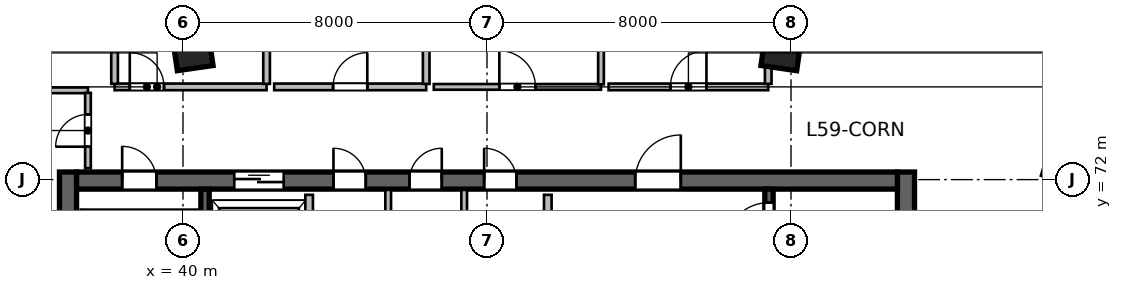
"""IFC4 building model, lengths in metres.
Left out: names, types, materials, properties, quantities, classifications, styles, units other than length and angle.
Written with IfcOpenShell. Run it as: python <this file> out.ifc"""

import sys

from ifc_helpers import new_model, si_unit, direction, frame, frame_2d, origin, origin_2d, place, context, subcontext, project, spatial, rectangle, extrude, source, transform, mapped, element, fill, save


model = new_model("IFC4")
c1 = context("Model", 3, precision=1e-05, world=origin(), true_north=direction((0.0, 1.0)))
c2 = subcontext(c1, "Body", "Model", "MODEL_VIEW")
j1 = project(units=[si_unit("LENGTHUNIT", "METRE"), si_unit("PLANEANGLEUNIT", "RADIAN")], contexts=[c1])
p1 = place(None, origin())
s1 = spatial("IfcSite", under=j1, at=p1, CompositionType="ELEMENT")
p2 = place(p1, origin())
s2 = spatial("IfcBuilding", under=s1, at=p2, CompositionType="ELEMENT")
p3 = place(p2, frame((0.0, 0.0, 243.0)))
s3 = spatial("IfcBuildingStorey", under=s2, at=p3, CompositionType="ELEMENT", Elevation=243.0)
m1 = source(origin(), c2, "Body", "SweptSolid", [
    extrude(rectangle(XDim=12.0, YDim=0.45, at=frame_2d((6.0, 0.0))), origin(), (0.0, 0.0, 1.0), 3.9),
])
for number, where, z_axis, x_axis in (
    (1, (36.975, 60.2, 0.0), (0.0, 0.0, 1.0), (0.0, 1.0, 0.0)),
    (2, (59.025, 60.2, 0.0), (0.0, 0.0, 1.0), (0.0, 1.0, 0.0)),
):
    element("IfcWall", number, at=place(p3, frame(where, z_axis=z_axis, x_axis=x_axis)), inside=s3, PredefinedType="SHEAR", context=c2, shape_type="MappedRepresentation", body=[
        mapped(m1, transform((0.0, 0.0, 0.0), scale=1.0)),
    ])
m2 = source(origin(), c2, "Body", "SweptSolid", [
    extrude(rectangle(XDim=21.6, YDim=0.45, at=frame_2d((10.8, 0.0))), origin(), (0.0, 0.0, 1.0), 3.9),
])
p4 = place(p3, frame((37.2, 71.975, 0.0), z_axis=(0.0, 0.0, 1.0), x_axis=(1.0, 0.0, 0.0)))
e3 = element("IfcWall", 3, at=p4, inside=s3, PredefinedType="SHEAR", context=c2, shape_type="MappedRepresentation", body=[
    mapped(m2, transform((0.0, 0.0, 0.0), scale=1.0)),
])
p5 = place(p4, frame((1.2, 0.0, 0.0)))
e4 = element("IfcOpeningElement", 4, at=p5, cuts=e3, PredefinedType="OPENING", context=c2, shape_type="SweptSolid", body=[
    extrude(rectangle(XDim=0.9, YDim=2.1, at=frame_2d((0.45, 1.05))), frame((0.0, 0.235, 0.0), z_axis=(0.0, -1.0, 0.0), x_axis=(1.0, 0.0, 0.0)), (0.0, 0.0, 1.0), 0.47),
])
p6 = place(p4, frame((14.7, 0.0, 0.0)))
e5 = element("IfcOpeningElement", 5, at=p6, cuts=e3, PredefinedType="OPENING", context=c2, shape_type="SweptSolid", body=[
    extrude(rectangle(XDim=1.2, YDim=2.15, at=frame_2d((0.6, 1.075))), frame((0.0, 0.235, 0.0), z_axis=(0.0, -1.0, 0.0), x_axis=(1.0, 0.0, 0.0)), (0.0, 0.0, 1.0), 0.47),
])
p7 = place(p4, frame((4.15, 0.0, 0.0)))
e6 = element("IfcOpeningElement", 6, at=p7, cuts=e3, PredefinedType="OPENING", context=c2, shape_type="SweptSolid", body=[
    extrude(rectangle(XDim=1.3, YDim=2.15, at=frame_2d((0.65, 1.075))), frame((0.0, 0.235, 0.0), z_axis=(0.0, -1.0, 0.0), x_axis=(1.0, 0.0, 0.0)), (0.0, 0.0, 1.0), 0.47),
])
p8 = place(p4, frame((6.76, 0.0, 0.0)))
e7 = element("IfcOpeningElement", 7, at=p8, cuts=e3, PredefinedType="OPENING", context=c2, shape_type="SweptSolid", body=[
    extrude(rectangle(XDim=0.85, YDim=2.1, at=frame_2d((0.425, 1.05))), frame((0.0, 0.235, 0.0), z_axis=(0.0, -1.0, 0.0), x_axis=(1.0, 0.0, 0.0)), (0.0, 0.0, 1.0), 0.47),
])
p9 = place(p4, frame((8.76, 0.0, 0.0)))
e8 = element("IfcOpeningElement", 8, at=p9, cuts=e3, PredefinedType="OPENING", context=c2, shape_type="SweptSolid", body=[
    extrude(rectangle(XDim=0.85, YDim=2.1, at=frame_2d((0.425, 1.05))), frame((0.0, 0.235, 0.0), z_axis=(0.0, -1.0, 0.0), x_axis=(1.0, 0.0, 0.0)), (0.0, 0.0, 1.0), 0.47),
])
p10 = place(p4, frame((10.725, 0.0, 0.0)))
e9 = element("IfcOpeningElement", 9, at=p10, cuts=e3, PredefinedType="OPENING", context=c2, shape_type="SweptSolid", body=[
    extrude(rectangle(XDim=0.85, YDim=2.1, at=frame_2d((0.425, 1.05))), frame((0.0, 0.235, 0.0), z_axis=(0.0, -1.0, 0.0), x_axis=(1.0, 0.0, 0.0)), (0.0, 0.0, 1.0), 0.47),
])
m3 = source(origin(), c2, "Body", "SweptSolid", [
    extrude(rectangle(XDim=11.1, YDim=0.22, at=frame_2d((5.55, 0.0))), origin(), (0.0, 0.0, 1.0), 3.9),
])
p11 = place(p3, frame((40.58, 60.65, 0.0), z_axis=(0.0, 0.0, 1.0), x_axis=(0.0, 1.0, 0.0)))
e10 = element("IfcWall", 10, at=p11, inside=s3, PredefinedType="SHEAR", context=c2, shape_type="MappedRepresentation", body=[
    mapped(m3, transform((0.0, 0.0, 0.0), scale=1.0)),
])
p12 = place(p3, frame((55.42, 60.65, 0.0), z_axis=(0.0, 0.0, 1.0), x_axis=(0.0, 1.0, 0.0)))
e11 = element("IfcWall", 11, at=p12, inside=s3, PredefinedType="SHEAR", context=c2, shape_type="MappedRepresentation", body=[
    mapped(m3, transform((0.0, 0.0, 0.0), scale=1.0)),
])
p13 = place(p12, frame((9.595, 0.0, 0.0)))
e12 = element("IfcOpeningElement", 12, at=p13, cuts=e11, PredefinedType="OPENING", context=c2, shape_type="SweptSolid", body=[
    extrude(rectangle(XDim=1.15, YDim=2.15, at=frame_2d((0.575, 1.075))), frame((0.0, 0.12, 0.0), z_axis=(0.0, -1.0, 0.0), x_axis=(1.0, 0.0, 0.0)), (0.0, 0.0, 1.0), 0.24),
])
m4 = source(origin(), c2, "Body", "SweptSolid", [
    extrude(rectangle(XDim=0.95, YDim=0.95, at=origin_2d()), origin(), (0.0, 0.0, 1.0), 3.9),
])
for number, where, z_axis, x_axis in (
    (13, (40.253, 75.404, 0.0), (0.0, 0.0, 1.0), (-0.143, 0.99, 0.0)),
    (14, (55.747, 75.404, 0.0), (0.0, 0.0, 1.0), (0.143, 0.99, 0.0)),
):
    element("IfcColumn", number, at=place(p3, frame(where, z_axis=z_axis, x_axis=x_axis)), inside=s3, PredefinedType="COLUMN", context=c2, shape_type="MappedRepresentation", body=[
        mapped(m4, transform((0.0, 0.0, 0.0), scale=1.0)),
    ])
m5 = source(origin(), c2, "Body", "SweptSolid", [
    extrude(rectangle(XDim=5.8, YDim=0.2, at=frame_2d((2.9, 0.0))), origin(), (0.0, 0.0, 1.0), 3.65),
])
p14 = place(p3, frame((49.6, 65.8, 0.0), z_axis=(0.0, 0.0, 1.0), x_axis=(0.0, 1.0, 0.0)))
e15 = element("IfcWall", 15, at=p14, inside=s3, PredefinedType="SOLIDWALL", context=c2, shape_type="MappedRepresentation", body=[
    mapped(m5, transform((0.0, 0.0, 0.0), scale=1.0)),
])
m6 = source(origin(), c2, "Body", "SweptSolid", [
    extrude(rectangle(XDim=3.2, YDim=0.2, at=frame_2d((1.6, 0.0))), origin(), (0.0, 0.0, 1.0), 3.65),
])
p15 = place(p3, frame((43.32, 68.4, 0.0), z_axis=(0.0, 0.0, 1.0), x_axis=(0.0, 1.0, 0.0)))
e16 = element("IfcWall", 16, at=p15, inside=s3, PredefinedType="SOLIDWALL", context=c2, shape_type="MappedRepresentation", body=[
    mapped(m6, transform((0.0, 0.0, 0.0), scale=1.0)),
])
m7 = source(origin(), c2, "Body", "SweptSolid", [
    extrude(rectangle(XDim=3.33, YDim=0.15, at=frame_2d((1.665, 0.0))), origin(), (0.0, 0.0, 1.0), 3.65),
])
for number, where, z_axis, x_axis in (
    (17, (45.4, 68.4, 0.0), (0.0, 0.0, 1.0), (0.0, 1.0, 0.0)),
    (18, (47.4, 68.4, 0.0), (0.0, 0.0, 1.0), (0.0, 1.0, 0.0)),
):
    element("IfcWall", number, at=place(p3, frame(where, z_axis=z_axis, x_axis=x_axis)), inside=s3, PredefinedType="PARTITIONING", context=c2, shape_type="MappedRepresentation", body=[
        mapped(m7, transform((0.0, 0.0, 0.0), scale=1.0)),
    ])
m8 = source(origin(), c2, "Body", "SweptSolid", [
    extrude(rectangle(XDim=3.1, YDim=0.15, at=frame_2d((1.55, 0.0))), origin(), (0.0, 0.0, 1.0), 3.081),
])
p16 = place(p3, frame((34.4, 74.35, 0.0), z_axis=(0.0, 0.0, 1.0), x_axis=(1.0, 0.0, 0.0)))
e19 = element("IfcWall", 19, at=p16, inside=s3, PredefinedType="PARTITIONING", context=c2, shape_type="MappedRepresentation", body=[
    mapped(m8, transform((0.0, 0.0, 0.0), scale=1.0)),
])
m9 = source(origin(), c2, "Body", "SweptSolid", [
    extrude(rectangle(XDim=1.982, YDim=0.15, at=frame_2d((0.991, 0.0))), origin(), (0.0, 0.0, 1.0), 3.65),
])
p17 = place(p3, frame((37.5, 72.3, 0.0), z_axis=(0.0, 0.0, 1.0), x_axis=(0.0, 1.0, 0.0)))
e20 = element("IfcWall", 20, at=p17, inside=s3, PredefinedType="PARTITIONING", context=c2, shape_type="MappedRepresentation", body=[
    mapped(m9, transform((0.0, 0.0, 0.0), scale=1.0)),
])
p18 = place(p17, frame((0.566, 0.0, 0.0)))
e21 = element("IfcOpeningElement", 21, at=p18, cuts=e20, PredefinedType="OPENING", context=c2, shape_type="SweptSolid", body=[
    extrude(rectangle(XDim=0.85, YDim=2.1, at=frame_2d((0.425, 1.05))), frame((0.0, 0.085, 0.0), z_axis=(0.0, -1.0, 0.0), x_axis=(1.0, 0.0, 0.0)), (0.0, 0.0, 1.0), 0.17),
])
m10 = source(origin(), c2, "Body", "SweptSolid", [
    extrude(rectangle(XDim=4.0, YDim=0.175, at=frame_2d((2.0, 0.0))), origin(), (0.0, 0.0, 1.0), 3.65),
])
p19 = place(p3, frame((38.2, 74.44, 0.0), z_axis=(0.0, 0.0, 1.0), x_axis=(1.0, 0.0, 0.0)))
e22 = element("IfcWall", 22, at=p19, inside=s3, PredefinedType="PARTITIONING", context=c2, shape_type="MappedRepresentation", body=[
    mapped(m10, transform((0.0, 0.0, 0.0), scale=1.0)),
])
p20 = place(p19, frame((0.4, 0.0, 0.0)))
e23 = element("IfcOpeningElement", 23, at=p20, cuts=e22, PredefinedType="OPENING", context=c2, shape_type="SweptSolid", body=[
    extrude(rectangle(XDim=0.9, YDim=2.08, at=frame_2d((0.45, 1.04))), frame((0.0, 0.098, 0.0), z_axis=(0.0, -1.0, 0.0), x_axis=(1.0, 0.0, 0.0)), (0.0, 0.0, 1.0), 0.195),
])
m11 = source(origin(), c2, "Body", "SweptSolid", [
    extrude(rectangle(XDim=2.403, YDim=0.175, at=frame_2d((1.201, 0.0))), origin(), (0.0, 0.0, 1.0), 3.65),
])
for number, where, z_axis, x_axis in (
    (24, (38.2, 74.519, 0.0), (0.0, 0.0, 1.0), (0.0, 1.0, 0.0)),
    (25, (42.2, 74.519, 0.0), (0.0, 0.0, 1.0), (0.0, 1.0, 0.0)),
):
    element("IfcWall", number, at=place(p3, frame(where, z_axis=z_axis, x_axis=x_axis)), inside=s3, PredefinedType="PARTITIONING", context=c2, shape_type="MappedRepresentation", body=[
        mapped(m11, transform((0.0, 0.0, 0.0), scale=1.0)),
    ])
p21 = place(p3, frame((42.4, 74.44, 0.0), z_axis=(0.0, 0.0, 1.0), x_axis=(1.0, 0.0, 0.0)))
e26 = element("IfcWall", 26, at=p21, inside=s3, PredefinedType="PARTITIONING", context=c2, shape_type="MappedRepresentation", body=[
    mapped(m10, transform((0.0, 0.0, 0.0), scale=1.0)),
])
p22 = place(p21, frame((1.55, 0.0, 0.0)))
e27 = element("IfcOpeningElement", 27, at=p22, cuts=e26, PredefinedType="OPENING", context=c2, shape_type="SweptSolid", body=[
    extrude(rectangle(XDim=0.9, YDim=2.08, at=frame_2d((0.45, 1.04))), frame((0.0, 0.098, 0.0), z_axis=(0.0, -1.0, 0.0), x_axis=(1.0, 0.0, 0.0)), (0.0, 0.0, 1.0), 0.195),
])
p23 = place(p3, frame((46.4, 74.519, 0.0), z_axis=(0.0, 0.0, 1.0), x_axis=(0.0, 1.0, 0.0)))
e28 = element("IfcWall", 28, at=p23, inside=s3, PredefinedType="PARTITIONING", context=c2, shape_type="MappedRepresentation", body=[
    mapped(m11, transform((0.0, 0.0, 0.0), scale=1.0)),
])
m12 = source(origin(), c2, "Body", "SweptSolid", [
    extrude(rectangle(XDim=4.4, YDim=0.15, at=frame_2d((2.2, 0.0))), origin(), (0.0, 0.0, 1.0), 3.65),
])
p24 = place(p3, frame((46.6, 74.44, 0.0), z_axis=(0.0, 0.0, 1.0), x_axis=(1.0, 0.0, 0.0)))
e29 = element("IfcWall", 29, at=p24, inside=s3, PredefinedType="PARTITIONING", context=c2, shape_type="MappedRepresentation", body=[
    mapped(m12, transform((0.0, 0.0, 0.0), scale=1.0)),
])
p25 = place(p24, frame((1.725, 0.0, 0.0)))
e30 = element("IfcOpeningElement", 30, at=p25, cuts=e29, PredefinedType="OPENING", context=c2, shape_type="SweptSolid", body=[
    extrude(rectangle(XDim=0.95, YDim=2.1, at=frame_2d((0.475, 1.05))), frame((0.0, 0.085, 0.0), z_axis=(0.0, -1.0, 0.0), x_axis=(1.0, 0.0, 0.0)), (0.0, 0.0, 1.0), 0.17),
])
m13 = source(origin(), c2, "Body", "SweptSolid", [
    extrude(rectangle(XDim=2.425, YDim=0.15, at=frame_2d((1.212, 0.0))), origin(), (0.0, 0.0, 1.0), 3.65),
])
p26 = place(p3, frame((51.0, 74.508, 0.0), z_axis=(0.0, 0.0, 1.0), x_axis=(0.0, 1.0, 0.0)))
e31 = element("IfcWall", 31, at=p26, inside=s3, PredefinedType="PARTITIONING", context=c2, shape_type="MappedRepresentation", body=[
    mapped(m13, transform((0.0, 0.0, 0.0), scale=1.0)),
])
m14 = source(origin(), c2, "Body", "SweptSolid", [
    extrude(rectangle(XDim=4.2, YDim=0.175, at=frame_2d((2.1, 0.0))), origin(), (0.0, 0.0, 1.0), 3.65),
])
p27 = place(p3, frame((51.2, 74.44, 0.0), z_axis=(0.0, 0.0, 1.0), x_axis=(1.0, 0.0, 0.0)))
e32 = element("IfcWall", 32, at=p27, inside=s3, PredefinedType="PARTITIONING", context=c2, shape_type="MappedRepresentation", body=[
    mapped(m14, transform((0.0, 0.0, 0.0), scale=1.0)),
])
p28 = place(p27, frame((1.625, 0.0, 0.0)))
e33 = element("IfcOpeningElement", 33, at=p28, cuts=e32, PredefinedType="OPENING", context=c2, shape_type="SweptSolid", body=[
    extrude(rectangle(XDim=0.95, YDim=2.12, at=frame_2d((0.475, 1.06))), frame((0.0, 0.098, 0.0), z_axis=(0.0, -1.0, 0.0), x_axis=(1.0, 0.0, 0.0)), (0.0, 0.0, 1.0), 0.195),
])
p29 = place(p3, frame((55.4, 74.519, 0.0), z_axis=(0.0, 0.0, 1.0), x_axis=(0.0, 1.0, 0.0)))
e34 = element("IfcWall", 34, at=p29, inside=s3, PredefinedType="PARTITIONING", context=c2, shape_type="MappedRepresentation", body=[
    mapped(m11, transform((0.0, 0.0, 0.0), scale=1.0)),
])
m15 = source(origin(), c2, "Body", "SweptSolid", [
    extrude(rectangle(XDim=0.9, YDim=2.1, at=frame_2d((0.45, 1.05))), frame((0.0, 0.025, 0.0), z_axis=(0.0, -1.0, 0.0), x_axis=(1.0, 0.0, 0.0)), (0.0, 0.0, 1.0), 0.05),
])
p30 = place(p5, origin())
e35 = element("IfcDoor", 35, at=p30, inside=s3, OperationType="SINGLE_SWING_LEFT", PredefinedType="DOOR", context=c2, shape_type="MappedRepresentation", body=[
    mapped(m15, transform((0.0, 0.0, 0.0), scale=1.0)),
])
fill(e4, e35)
m16 = source(origin(), c2, "Body", "SweptSolid", [
    extrude(rectangle(XDim=1.15, YDim=2.15, at=frame_2d((0.575, 1.075))), frame((0.0, 0.025, 0.0), z_axis=(0.0, -1.0, 0.0), x_axis=(1.0, 0.0, 0.0)), (0.0, 0.0, 1.0), 0.05),
])
p31 = place(p13, origin())
e36 = element("IfcDoor", 36, at=p31, inside=s3, OperationType="SINGLE_SWING_LEFT", PredefinedType="DOOR", context=c2, shape_type="MappedRepresentation", body=[
    mapped(m16, transform((0.0, 0.0, 0.0), scale=1.0)),
])
fill(e12, e36)
m17 = source(origin(), c2, "Body", "SweptSolid", [
    extrude(rectangle(XDim=1.2, YDim=2.15, at=frame_2d((0.6, 1.075))), frame((0.0, 0.025, 0.0), z_axis=(0.0, -1.0, 0.0), x_axis=(1.0, 0.0, 0.0)), (0.0, 0.0, 1.0), 0.05),
])
p32 = place(p6, origin())
e37 = element("IfcDoor", 37, at=p32, inside=s3, OperationType="SINGLE_SWING_RIGHT", PredefinedType="DOOR", context=c2, shape_type="MappedRepresentation", body=[
    mapped(m17, transform((0.0, 0.0, 0.0), scale=1.0)),
])
fill(e5, e37)
m18 = source(origin(), c2, "Body", "SweptSolid", [
    extrude(rectangle(XDim=1.3, YDim=2.15, at=frame_2d((0.65, 1.075))), frame((0.0, 0.025, 0.0), z_axis=(0.0, -1.0, 0.0), x_axis=(1.0, 0.0, 0.0)), (0.0, 0.0, 1.0), 0.05),
])
p33 = place(p7, origin())
e38 = element("IfcDoor", 38, at=p33, inside=s3, OperationType="DOUBLE_DOOR_SLIDING", PredefinedType="DOOR", context=c2, shape_type="MappedRepresentation", body=[
    mapped(m18, transform((0.0, 0.0, 0.0), scale=1.0)),
])
fill(e6, e38)
m19 = source(origin(), c2, "Body", "SweptSolid", [
    extrude(rectangle(XDim=0.85, YDim=2.1, at=frame_2d((0.425, 1.05))), frame((0.0, 0.025, 0.0), z_axis=(0.0, -1.0, 0.0), x_axis=(1.0, 0.0, 0.0)), (0.0, 0.0, 1.0), 0.05),
])
p34 = place(p8, origin())
e39 = element("IfcDoor", 39, at=p34, inside=s3, OperationType="SINGLE_SWING_LEFT", PredefinedType="DOOR", context=c2, shape_type="MappedRepresentation", body=[
    mapped(m19, transform((0.0, 0.0, 0.0), scale=1.0)),
])
fill(e7, e39)
p35 = place(p9, origin())
e40 = element("IfcDoor", 40, at=p35, inside=s3, OperationType="SINGLE_SWING_RIGHT", PredefinedType="DOOR", context=c2, shape_type="MappedRepresentation", body=[
    mapped(m19, transform((0.0, 0.0, 0.0), scale=1.0)),
])
fill(e8, e40)
p36 = place(p10, origin())
e41 = element("IfcDoor", 41, at=p36, inside=s3, OperationType="SINGLE_SWING_LEFT", PredefinedType="DOOR", context=c2, shape_type="MappedRepresentation", body=[
    mapped(m19, transform((0.0, 0.0, 0.0), scale=1.0)),
])
fill(e9, e41)
p37 = place(p18, origin())
e42 = element("IfcDoor", 42, at=p37, inside=s3, OperationType="SINGLE_SWING_LEFT", PredefinedType="DOOR", context=c2, shape_type="MappedRepresentation", body=[
    mapped(m19, transform((0.0, 0.0, 0.0), scale=1.0)),
])
fill(e21, e42)
m20 = source(origin(), c2, "Body", "SweptSolid", [
    extrude(rectangle(XDim=0.9, YDim=2.08, at=frame_2d((0.45, 1.04))), frame((0.0, 0.025, 0.0), z_axis=(0.0, -1.0, 0.0), x_axis=(1.0, 0.0, 0.0)), (0.0, 0.0, 1.0), 0.05),
])
p38 = place(p20, origin())
e43 = element("IfcDoor", 43, at=p38, inside=s3, OperationType="SINGLE_SWING_LEFT", PredefinedType="DOOR", context=c2, shape_type="MappedRepresentation", body=[
    mapped(m20, transform((0.0, 0.0, 0.0), scale=1.0)),
])
fill(e23, e43)
p39 = place(p22, origin())
e44 = element("IfcDoor", 44, at=p39, inside=s3, OperationType="SINGLE_SWING_RIGHT", PredefinedType="DOOR", context=c2, shape_type="MappedRepresentation", body=[
    mapped(m20, transform((0.0, 0.0, 0.0), scale=1.0)),
])
fill(e27, e44)
m21 = source(origin(), c2, "Body", "SweptSolid", [
    extrude(rectangle(XDim=0.95, YDim=2.1, at=frame_2d((0.475, 1.05))), frame((0.0, 0.025, 0.0), z_axis=(0.0, -1.0, 0.0), x_axis=(1.0, 0.0, 0.0)), (0.0, 0.0, 1.0), 0.05),
])
p40 = place(p25, origin())
e45 = element("IfcDoor", 45, at=p40, inside=s3, OperationType="SINGLE_SWING_LEFT", PredefinedType="DOOR", context=c2, shape_type="MappedRepresentation", body=[
    mapped(m21, transform((0.0, 0.0, 0.0), scale=1.0)),
])
fill(e30, e45)
m22 = source(origin(), c2, "Body", "SweptSolid", [
    extrude(rectangle(XDim=0.95, YDim=2.12, at=frame_2d((0.475, 1.06))), frame((0.0, 0.025, 0.0), z_axis=(0.0, -1.0, 0.0), x_axis=(1.0, 0.0, 0.0)), (0.0, 0.0, 1.0), 0.05),
])
p41 = place(p28, origin())
e46 = element("IfcDoor", 46, at=p41, inside=s3, OperationType="SINGLE_SWING_RIGHT", PredefinedType="DOOR", context=c2, shape_type="MappedRepresentation", body=[
    mapped(m22, transform((0.0, 0.0, 0.0), scale=1.0)),
])
fill(e33, e46)
save(model, sys.argv[1])
